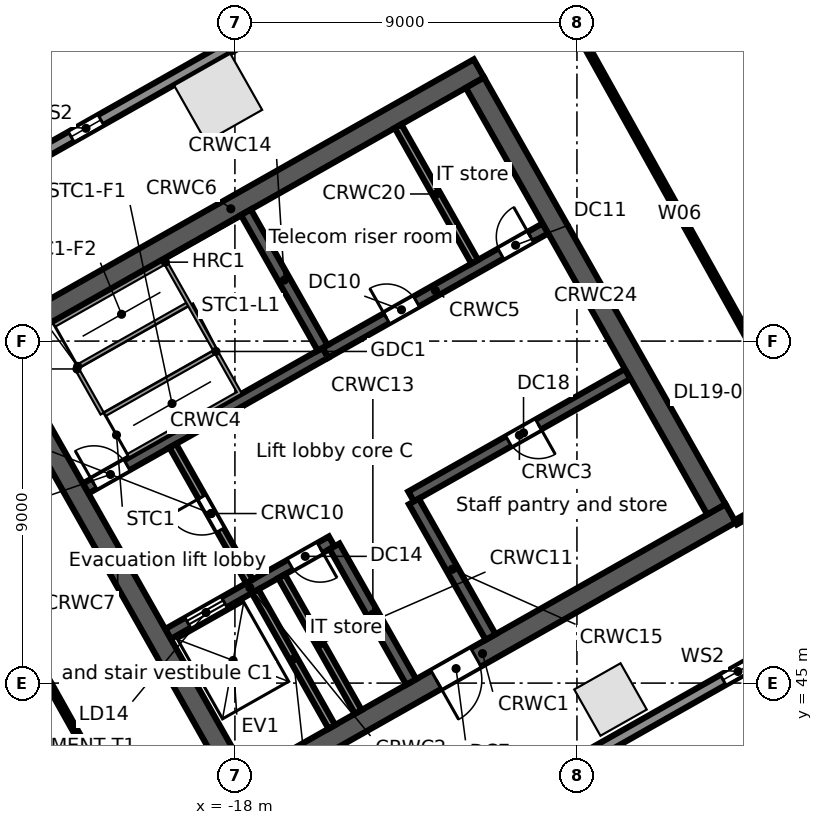
"""IFC4 building model, lengths in metres.
Left out: names, types, materials, properties, quantities, classifications, styles, units other than length and angle.
Written with IfcOpenShell. Run it as: python <this file> out.ifc"""

import sys

from ifc_helpers import new_model, si_unit, direction, frame, frame_2d, origin, origin_2d, place, context, subcontext, project, spatial, rectangle, extrude, element, fill, save


model = new_model("IFC4")
c1 = context("Model", 3, precision=1e-05, world=origin(), true_north=direction((0.0, 1.0)))
c2 = subcontext(c1, "Body", "Model", "MODEL_VIEW")
j1 = project(units=[si_unit("LENGTHUNIT", "METRE"), si_unit("PLANEANGLEUNIT", "RADIAN")], contexts=[c1])
p1 = place(None, origin())
s1 = spatial("IfcSite", under=j1, at=p1, CompositionType="ELEMENT")
p2 = place(p1, origin())
s2 = spatial("IfcBuilding", under=s1, at=p2, CompositionType="ELEMENT")
p3 = place(p2, frame((0.0, 0.0, 97.1)))
s3 = spatial("IfcBuildingStorey", under=s2, at=p3, CompositionType="ELEMENT", Elevation=97.1)
p4 = place(p3, frame((-18.441, 60.406, 0.0), z_axis=(0.0, 0.0, 1.0), x_axis=(-0.87035569594, -0.492423560103, 0.0)))
e1 = element("IfcColumn", 1, at=p4, inside=s3, PredefinedType="COLUMN", context=c2, shape_type="SweptSolid", body=[
    extrude(rectangle(XDim=1.7, YDim=1.7, at=origin_2d()), origin(), (0.0, 0.0, 1.0), 4.4),
])
p5 = place(p3, frame((-8.117, 44.568, 0.0), z_axis=(0.0, 0.0, 1.0), x_axis=(0.87035569594, 0.492423560103, 0.0)))
e2 = element("IfcColumn", 2, at=p5, inside=s3, PredefinedType="COLUMN", context=c2, shape_type="SweptSolid", body=[
    extrude(rectangle(XDim=1.4, YDim=1.4, at=origin_2d()), origin(), (0.0, 0.0, 1.0), 4.4),
])
p6 = place(p3, frame((-58.745, 38.764, 0.0), z_axis=(0.0, 0.0, 1.0), x_axis=(0.870355811726, 0.492423355453, 0.0)))
e3 = element("IfcWall", 3, at=p6, inside=s3, PredefinedType="STANDARD", context=c2, shape_type="SweptSolid", body=[
    extrude(rectangle(XDim=64.025, YDim=0.3, at=frame_2d((32.013, 0.0))), origin(), (0.0, 0.0, 1.0), 4.08),
])
p7 = place(p6, frame((60.122, 0.0, 0.6)))
e4 = element("IfcOpeningElement", 4, at=p7, cuts=e3, PredefinedType="OPENING", context=c2, shape_type="SweptSolid", body=[
    extrude(rectangle(XDim=0.9, YDim=2.8, at=frame_2d((0.45, 1.4))), frame((0.0, 0.16, 0.0), z_axis=(0.0, -1.0, 0.0), x_axis=(1.0, 0.0, 0.0)), (0.0, 0.0, 1.0), 0.32),
])
p8 = place(p6, frame((50.992, 0.0, 0.6)))
e5 = element("IfcOpeningElement", 5, at=p8, cuts=e3, PredefinedType="OPENING", context=c2, shape_type="SweptSolid", body=[
    extrude(rectangle(XDim=0.9, YDim=2.8, at=frame_2d((0.45, 1.4))), frame((0.0, 0.16, 0.0), z_axis=(0.0, -1.0, 0.0), x_axis=(1.0, 0.0, 0.0)), (0.0, 0.0, 1.0), 0.32),
])
p9 = place(p6, frame((41.862, 0.0, 0.6)))
e6 = element("IfcOpeningElement", 6, at=p9, cuts=e3, PredefinedType="OPENING", context=c2, shape_type="SweptSolid", body=[
    extrude(rectangle(XDim=0.9, YDim=2.8, at=frame_2d((0.45, 1.4))), frame((0.0, 0.16, 0.0), z_axis=(0.0, -1.0, 0.0), x_axis=(1.0, 0.0, 0.0)), (0.0, 0.0, 1.0), 0.32),
])
p10 = place(p6, frame((32.732, 0.0, 0.6)))
e7 = element("IfcOpeningElement", 7, at=p10, cuts=e3, PredefinedType="OPENING", context=c2, shape_type="SweptSolid", body=[
    extrude(rectangle(XDim=0.9, YDim=2.8, at=frame_2d((0.45, 1.4))), frame((0.0, 0.16, 0.0), z_axis=(0.0, -1.0, 0.0), x_axis=(1.0, 0.0, 0.0)), (0.0, 0.0, 1.0), 0.32),
])
p11 = place(p6, frame((23.602, 0.0, 0.6)))
e8 = element("IfcOpeningElement", 8, at=p11, cuts=e3, PredefinedType="OPENING", context=c2, shape_type="SweptSolid", body=[
    extrude(rectangle(XDim=0.9, YDim=2.8, at=frame_2d((0.45, 1.4))), frame((0.0, 0.16, 0.0), z_axis=(0.0, -1.0, 0.0), x_axis=(1.0, 0.0, 0.0)), (0.0, 0.0, 1.0), 0.32),
])
p12 = place(p6, frame((14.472, 0.0, 0.6)))
e9 = element("IfcOpeningElement", 9, at=p12, cuts=e3, PredefinedType="OPENING", context=c2, shape_type="SweptSolid", body=[
    extrude(rectangle(XDim=0.9, YDim=2.8, at=frame_2d((0.45, 1.4))), frame((0.0, 0.16, 0.0), z_axis=(0.0, -1.0, 0.0), x_axis=(1.0, 0.0, 0.0)), (0.0, 0.0, 1.0), 0.32),
])
p13 = place(p6, frame((5.342, 0.0, 0.6)))
e10 = element("IfcOpeningElement", 10, at=p13, cuts=e3, PredefinedType="OPENING", context=c2, shape_type="SweptSolid", body=[
    extrude(rectangle(XDim=0.9, YDim=2.8, at=frame_2d((0.45, 1.4))), frame((0.0, 0.16, 0.0), z_axis=(0.0, -1.0, 0.0), x_axis=(1.0, 0.0, 0.0)), (0.0, 0.0, 1.0), 0.32),
])
p14 = place(p3, frame((-0.055, 47.969, 0.0), z_axis=(0.0, 0.0, 1.0), x_axis=(-0.870355730478, -0.492423499058, 0.0)))
e11 = element("IfcWall", 11, at=p14, inside=s3, PredefinedType="STANDARD", context=c2, shape_type="SweptSolid", body=[
    extrude(rectangle(XDim=43.75, YDim=0.3, at=frame_2d((21.875, 0.0))), origin(), (0.0, 0.0, 1.0), 4.08),
])
p15 = place(p14, frame((39.977, 0.0, 0.6)))
e12 = element("IfcOpeningElement", 12, at=p15, cuts=e11, PredefinedType="OPENING", context=c2, shape_type="SweptSolid", body=[
    extrude(rectangle(XDim=0.9, YDim=2.8, at=frame_2d((0.45, 1.4))), frame((0.0, 0.16, 0.0), z_axis=(0.0, -1.0, 0.0), x_axis=(1.0, 0.0, 0.0)), (0.0, 0.0, 1.0), 0.32),
])
p16 = place(p14, frame((31.222, 0.0, 0.6)))
e13 = element("IfcOpeningElement", 13, at=p16, cuts=e11, PredefinedType="OPENING", context=c2, shape_type="SweptSolid", body=[
    extrude(rectangle(XDim=0.9, YDim=2.8, at=frame_2d((0.45, 1.4))), frame((0.0, 0.16, 0.0), z_axis=(0.0, -1.0, 0.0), x_axis=(1.0, 0.0, 0.0)), (0.0, 0.0, 1.0), 0.32),
])
p17 = place(p14, frame((22.468, 0.0, 0.6)))
e14 = element("IfcOpeningElement", 14, at=p17, cuts=e11, PredefinedType="OPENING", context=c2, shape_type="SweptSolid", body=[
    extrude(rectangle(XDim=0.9, YDim=2.8, at=frame_2d((0.45, 1.4))), frame((0.0, 0.16, 0.0), z_axis=(0.0, -1.0, 0.0), x_axis=(1.0, 0.0, 0.0)), (0.0, 0.0, 1.0), 0.32),
])
p18 = place(p14, frame((13.713, 0.0, 0.6)))
e15 = element("IfcOpeningElement", 15, at=p18, cuts=e11, PredefinedType="OPENING", context=c2, shape_type="SweptSolid", body=[
    extrude(rectangle(XDim=0.9, YDim=2.8, at=frame_2d((0.45, 1.4))), frame((0.0, 0.16, 0.0), z_axis=(0.0, -1.0, 0.0), x_axis=(1.0, 0.0, 0.0)), (0.0, 0.0, 1.0), 0.32),
])
p19 = place(p14, frame((4.959, 0.0, 0.6)))
e16 = element("IfcOpeningElement", 16, at=p19, cuts=e11, PredefinedType="OPENING", context=c2, shape_type="SweptSolid", body=[
    extrude(rectangle(XDim=0.9, YDim=2.8, at=frame_2d((0.45, 1.4))), frame((0.0, 0.16, 0.0), z_axis=(0.0, -1.0, 0.0), x_axis=(1.0, 0.0, 0.0)), (0.0, 0.0, 1.0), 0.32),
])
p20 = place(p3, frame((-18.012, 42.083, 0.0), z_axis=(0.0, 0.0, 1.0), x_axis=(0.870360574057, 0.492414937962, 0.0)))
e17 = element("IfcWall", 17, at=p20, inside=s3, PredefinedType="SOLIDWALL", context=c2, shape_type="SweptSolid", body=[
    extrude(rectangle(XDim=15.0, YDim=0.55, at=frame_2d((7.5, 0.0))), origin(), (0.0, 0.0, 1.0), 4.08),
])
p21 = place(p20, frame((6.1, 0.0, 0.0)))
e18 = element("IfcOpeningElement", 18, at=p21, cuts=e17, PredefinedType="OPENING", context=c2, shape_type="SweptSolid", body=[
    extrude(rectangle(XDim=1.2, YDim=2.1, at=frame_2d((0.6, 1.05))), frame((0.0, 0.285, 0.0), z_axis=(0.0, -1.0, 0.0), x_axis=(1.0, 0.0, 0.0)), (0.0, 0.0, 1.0), 0.57),
])
p22 = place(p3, frame((-19.762, 46.292, 0.0), z_axis=(0.0, 0.0, 1.0), x_axis=(0.870359758983, 0.49241637863, 0.0)))
e19 = element("IfcWall", 19, at=p22, inside=s3, PredefinedType="SOLIDWALL", context=c2, shape_type="SweptSolid", body=[
    extrude(rectangle(XDim=4.95, YDim=0.3, at=frame_2d((2.475, 0.0))), origin(), (0.0, 0.0, 1.0), 4.08),
])
p23 = place(p22, frame((0.6, 0.0, 0.0)))
e20 = element("IfcOpeningElement", 20, at=p23, cuts=e19, PredefinedType="OPENING", context=c2, shape_type="SweptSolid", body=[
    extrude(rectangle(XDim=1.1, YDim=2.1, at=frame_2d((0.55, 1.05))), frame((0.0, 0.16, 0.0), z_axis=(0.0, -1.0, 0.0), x_axis=(1.0, 0.0, 0.0)), (0.0, 0.0, 1.0), 0.32),
])
p24 = place(p22, frame((3.7, 0.0, 0.0)))
e21 = element("IfcOpeningElement", 21, at=p24, cuts=e19, PredefinedType="OPENING", context=c2, shape_type="SweptSolid", body=[
    extrude(rectangle(XDim=0.9, YDim=2.1, at=frame_2d((0.45, 1.05))), frame((0.0, 0.16, 0.0), z_axis=(0.0, -1.0, 0.0), x_axis=(1.0, 0.0, 0.0)), (0.0, 0.0, 1.0), 0.32),
])
p25 = place(p3, frame((-13.365, 49.911, 0.0), z_axis=(0.0, 0.0, 1.0), x_axis=(0.870336435567, 0.492457601144, 0.0)))
e22 = element("IfcWall", 22, at=p25, inside=s3, PredefinedType="SOLIDWALL", context=c2, shape_type="SweptSolid", body=[
    extrude(rectangle(XDim=6.55, YDim=0.3, at=frame_2d((3.275, 0.0))), origin(), (0.0, 0.0, 1.0), 4.08),
])
p26 = place(p25, frame((2.95, 0.0, 0.0)))
e23 = element("IfcOpeningElement", 23, at=p26, cuts=e22, PredefinedType="OPENING", context=c2, shape_type="SweptSolid", body=[
    extrude(rectangle(XDim=0.9, YDim=2.1, at=frame_2d((0.45, 1.05))), frame((0.0, 0.16, 0.0), z_axis=(0.0, -1.0, 0.0), x_axis=(1.0, 0.0, 0.0)), (0.0, 0.0, 1.0), 0.32),
])
p27 = place(p3, frame((-21.928, 50.121, 0.0), z_axis=(0.0, 0.0, 1.0), x_axis=(0.870340732628, 0.49245000673, 0.0)))
e24 = element("IfcWall", 24, at=p27, inside=s3, PredefinedType="SOLIDWALL", context=c2, shape_type="SweptSolid", body=[
    extrude(rectangle(XDim=7.25, YDim=0.3, at=frame_2d((3.625, 0.0))), origin(), (0.0, 0.0, 1.0), 4.08),
])
p28 = place(p27, frame((0.25, 0.0, 0.0)))
e25 = element("IfcOpeningElement", 25, at=p28, cuts=e24, PredefinedType="OPENING", context=c2, shape_type="SweptSolid", body=[
    extrude(rectangle(XDim=1.0, YDim=2.1, at=frame_2d((0.5, 1.05))), frame((0.0, 0.16, 0.0), z_axis=(0.0, -1.0, 0.0), x_axis=(1.0, 0.0, 0.0)), (0.0, 0.0, 1.0), 0.32),
])
p29 = place(p3, frame((-15.618, 53.691, 0.0), z_axis=(0.0, 0.0, 1.0), x_axis=(0.870367894134, 0.492401999246, 0.0)))
e26 = element("IfcWall", 26, at=p29, inside=s3, PredefinedType="SOLIDWALL", context=c2, shape_type="SweptSolid", body=[
    extrude(rectangle(XDim=6.65, YDim=0.3, at=frame_2d((3.325, 0.0))), origin(), (0.0, 0.0, 1.0), 4.08),
])
p30 = place(p29, frame((1.85, 0.0, 0.0)))
e27 = element("IfcOpeningElement", 27, at=p30, cuts=e26, PredefinedType="OPENING", context=c2, shape_type="SweptSolid", body=[
    extrude(rectangle(XDim=0.9, YDim=2.1, at=frame_2d((0.45, 1.05))), frame((0.0, 0.16, 0.0), z_axis=(0.0, -1.0, 0.0), x_axis=(1.0, 0.0, 0.0)), (0.0, 0.0, 1.0), 0.32),
])
p31 = place(p29, frame((5.3, 0.0, 0.0)))
e28 = element("IfcOpeningElement", 28, at=p31, cuts=e26, PredefinedType="OPENING", context=c2, shape_type="SweptSolid", body=[
    extrude(rectangle(XDim=0.9, YDim=2.1, at=frame_2d((0.45, 1.05))), frame((0.0, 0.16, 0.0), z_axis=(0.0, -1.0, 0.0), x_axis=(1.0, 0.0, 0.0)), (0.0, 0.0, 1.0), 0.32),
])
p32 = place(p3, frame((-24.635, 53.789, 0.0), z_axis=(0.0, 0.0, 1.0), x_axis=(0.870360574057, 0.492414937962, 0.0)))
e29 = element("IfcWall", 29, at=p32, inside=s3, PredefinedType="SOLIDWALL", context=c2, shape_type="SweptSolid", body=[
    extrude(rectangle(XDim=15.0, YDim=0.55, at=frame_2d((7.5, 0.0))), origin(), (0.0, 0.0, 1.0), 4.08),
])
p33 = place(p3, frame((-24.26, 53.685, 0.0), z_axis=(0.0, 0.0, 1.0), x_axis=(0.492427022044, -0.870353737259, 0.0)))
e30 = element("IfcWall", 30, at=p33, inside=s3, PredefinedType="SOLIDWALL", context=c2, shape_type="SweptSolid", body=[
    extrude(rectangle(XDim=12.9, YDim=0.55, at=frame_2d((6.45, 0.0))), origin(), (0.0, 0.0, 1.0), 4.08),
])
p34 = place(p3, frame((-17.469, 47.417, 0.0), z_axis=(0.0, 0.0, 1.0), x_axis=(0.492453559952, -0.87033872216, 0.0)))
e31 = element("IfcWall", 31, at=p34, inside=s3, PredefinedType="SOLIDWALL", context=c2, shape_type="SweptSolid", body=[
    extrude(rectangle(XDim=4.1, YDim=0.2, at=frame_2d((2.05, 0.0))), origin(), (0.0, 0.0, 1.0), 4.08),
])
p35 = place(p3, frame((-19.635, 51.246, 0.0), z_axis=(0.0, 0.0, 1.0), x_axis=(0.492408451753, -0.87036424366, 0.0)))
e32 = element("IfcWall", 32, at=p35, inside=s3, PredefinedType="PARTITIONING", context=c2, shape_type="SweptSolid", body=[
    extrude(rectangle(XDim=4.1, YDim=0.2, at=frame_2d((2.05, 0.0))), origin(), (0.0, 0.0, 1.0), 4.08),
])
p36 = place(p35, frame((1.55, 0.0, 0.0)))
e33 = element("IfcOpeningElement", 33, at=p36, cuts=e32, PredefinedType="OPENING", context=c2, shape_type="SweptSolid", body=[
    extrude(rectangle(XDim=1.0, YDim=2.1, at=frame_2d((0.5, 1.05))), frame((0.0, 0.11, 0.0), z_axis=(0.0, -1.0, 0.0), x_axis=(1.0, 0.0, 0.0)), (0.0, 0.0, 1.0), 0.22),
])
p37 = place(p3, frame((-16.772, 47.811, 0.0), z_axis=(0.0, 0.0, 1.0), x_axis=(0.492428039142, -0.870353161807, 0.0)))
e34 = element("IfcWall", 34, at=p37, inside=s3, PredefinedType="SOLIDWALL", context=c2, shape_type="SweptSolid", body=[
    extrude(rectangle(XDim=4.1, YDim=0.2, at=frame_2d((2.05, 0.0))), origin(), (0.0, 0.0, 1.0), 4.08),
])
for number, where, z_axis, x_axis in (
    (35, (-15.379, 48.599, 0.0), (0.0, 0.0, 1.0), (0.492, -0.87, 0.0)),
    (36, (-17.711, 57.39, 0.0), (0.0, 0.0, 1.0), (0.492, -0.87, 0.0)),
):
    element("IfcWall", number, at=place(p3, frame(where, z_axis=z_axis, x_axis=x_axis)), inside=s3, PredefinedType="SOLIDWALL", context=c2, shape_type="SweptSolid", body=[
        extrude(rectangle(XDim=4.1, YDim=0.3, at=frame_2d((2.05, 0.0))), origin(), (0.0, 0.0, 1.0), 4.08),
    ])
p38 = place(p3, frame((-13.291, 49.781, 0.0), z_axis=(0.0, 0.0, 1.0), x_axis=(0.492382931784, -0.870378681085, 0.0)))
e37 = element("IfcWall", 37, at=p38, inside=s3, PredefinedType="SOLIDWALL", context=c2, shape_type="SweptSolid", body=[
    extrude(rectangle(XDim=4.1, YDim=0.3, at=frame_2d((2.05, 0.0))), origin(), (0.0, 0.0, 1.0), 4.08),
])
p39 = place(p3, frame((-13.708, 59.656, 0.0), z_axis=(0.0, 0.0, 1.0), x_axis=(0.492428039142, -0.870353161807, 0.0)))
e38 = element("IfcWall", 38, at=p39, inside=s3, PredefinedType="PARTITIONING", context=c2, shape_type="SweptSolid", body=[
    extrude(rectangle(XDim=4.1, YDim=0.2, at=frame_2d((2.05, 0.0))), origin(), (0.0, 0.0, 1.0), 4.08),
])
p40 = place(p3, frame((-11.684, 60.8, 0.0), z_axis=(0.0, 0.0, 1.0), x_axis=(0.492427022044, -0.870353737259, 0.0)))
e39 = element("IfcWall", 39, at=p40, inside=s3, PredefinedType="SOLIDWALL", context=c2, shape_type="SweptSolid", body=[
    extrude(rectangle(XDim=12.9, YDim=0.55, at=frame_2d((6.45, 0.0))), origin(), (0.0, 0.0, 1.0), 4.08),
])
p41 = place(p3, frame((-28.799, 55.534, 0.0), z_axis=(0.0, 0.0, 1.0), x_axis=(0.488587464104, -0.872514922463, 0.0)))
e40 = element("IfcWall", 40, at=p41, inside=s3, PredefinedType="PARTITIONING", context=c2, shape_type="SweptSolid", body=[
    extrude(rectangle(XDim=17.295, YDim=0.125, at=frame_2d((8.647, 0.0))), origin(), (0.0, 0.0, 1.0), 3.148),
])
p42 = place(p3, frame((-10.088, 64.155, 0.0), z_axis=(0.0, 0.0, 1.0), x_axis=(0.486446127767, -0.873710572661, 0.0)))
e41 = element("IfcWall", 41, at=p42, inside=s3, PredefinedType="PARTITIONING", context=c2, shape_type="SweptSolid", body=[
    extrude(rectangle(XDim=15.584, YDim=0.125, at=frame_2d((7.792, 0.0))), origin(), (0.0, 0.0, 1.0), 3.16),
])
p43 = place(p3, frame((-4.821, 49.23, 0.0), z_axis=(0.0, 0.0, 1.0), x_axis=(0.870371217631, 0.492396124598, 0.0)))
e42 = element("IfcWall", 42, at=p43, inside=s3, PredefinedType="PARTITIONING", context=c2, shape_type="SweptSolid", body=[
    extrude(rectangle(XDim=2.659, YDim=0.125, at=frame_2d((1.329, 0.0))), origin(), (0.0, 0.0, 1.0), 4.08),
])
p44 = place(p9, origin())
e43 = element("IfcWindow", 43, at=p44, inside=s3, PartitioningType="SINGLE_PANEL", PredefinedType="WINDOW", context=c2, shape_type="SweptSolid", body=[
    extrude(rectangle(XDim=0.9, YDim=2.8, at=frame_2d((0.45, 1.4))), frame((0.0, 0.03, 0.0), z_axis=(0.0, -1.0, 0.0), x_axis=(1.0, 0.0, 0.0)), (0.0, 0.0, 1.0), 0.06),
])
fill(e6, e43)
p45 = place(p19, origin())
e44 = element("IfcWindow", 44, at=p45, inside=s3, PartitioningType="SINGLE_PANEL", PredefinedType="WINDOW", context=c2, shape_type="SweptSolid", body=[
    extrude(rectangle(XDim=0.9, YDim=2.8, at=frame_2d((0.45, 1.4))), frame((0.0, 0.03, 0.0), z_axis=(0.0, -1.0, 0.0), x_axis=(1.0, 0.0, 0.0)), (0.0, 0.0, 1.0), 0.06),
])
fill(e16, e44)
p46 = place(p23, origin())
e45 = element("IfcDoor", 45, at=p46, inside=s3, OperationType="DOUBLE_DOOR_SLIDING", PredefinedType="DOOR", context=c2, shape_type="SweptSolid", body=[
    extrude(rectangle(XDim=1.1, YDim=2.1, at=frame_2d((0.55, 1.05))), frame((0.0, 0.025, 0.0), z_axis=(0.0, -1.0, 0.0), x_axis=(1.0, 0.0, 0.0)), (0.0, 0.0, 1.0), 0.05),
])
fill(e20, e45)
p47 = place(p28, origin())
e46 = element("IfcDoor", 46, at=p47, inside=s3, OperationType="SINGLE_SWING_LEFT", PredefinedType="DOOR", context=c2, shape_type="SweptSolid", body=[
    extrude(rectangle(XDim=1.0, YDim=2.1, at=frame_2d((0.5, 1.05))), frame((0.0, 0.025, 0.0), z_axis=(0.0, -1.0, 0.0), x_axis=(1.0, 0.0, 0.0)), (0.0, 0.0, 1.0), 0.05),
])
fill(e25, e46)
p48 = place(p36, frame((1.0, 0.0, 0.0), z_axis=(0.0, 0.0, 1.0), x_axis=(-1.0, 0.0, 0.0)))
e47 = element("IfcDoor", 47, at=p48, inside=s3, OperationType="SINGLE_SWING_RIGHT", PredefinedType="DOOR", context=c2, shape_type="SweptSolid", body=[
    extrude(rectangle(XDim=1.0, YDim=2.1, at=frame_2d((0.5, 1.05))), frame((0.0, 0.025, 0.0), z_axis=(0.0, -1.0, 0.0), x_axis=(1.0, 0.0, 0.0)), (0.0, 0.0, 1.0), 0.05),
])
fill(e33, e47)
p49 = place(p21, frame((1.2, 0.0, 0.0), z_axis=(0.0, 0.0, 1.0), x_axis=(-1.0, 0.0, 0.0)))
e48 = element("IfcDoor", 48, at=p49, inside=s3, OperationType="SINGLE_SWING_RIGHT", PredefinedType="DOOR", context=c2, shape_type="SweptSolid", body=[
    extrude(rectangle(XDim=1.2, YDim=2.1, at=frame_2d((0.6, 1.05))), frame((0.0, 0.025, 0.0), z_axis=(0.0, -1.0, 0.0), x_axis=(1.0, 0.0, 0.0)), (0.0, 0.0, 1.0), 0.05),
])
fill(e18, e48)
p50 = place(p30, origin())
e49 = element("IfcDoor", 49, at=p50, inside=s3, OperationType="SINGLE_SWING_LEFT", PredefinedType="DOOR", context=c2, shape_type="SweptSolid", body=[
    extrude(rectangle(XDim=0.9, YDim=2.1, at=frame_2d((0.45, 1.05))), frame((0.0, 0.025, 0.0), z_axis=(0.0, -1.0, 0.0), x_axis=(1.0, 0.0, 0.0)), (0.0, 0.0, 1.0), 0.05),
])
fill(e27, e49)
p51 = place(p31, origin())
e50 = element("IfcDoor", 50, at=p51, inside=s3, OperationType="SINGLE_SWING_RIGHT", PredefinedType="DOOR", context=c2, shape_type="SweptSolid", body=[
    extrude(rectangle(XDim=0.9, YDim=2.1, at=frame_2d((0.45, 1.05))), frame((0.0, 0.025, 0.0), z_axis=(0.0, -1.0, 0.0), x_axis=(1.0, 0.0, 0.0)), (0.0, 0.0, 1.0), 0.05),
])
fill(e28, e50)
p52 = place(p24, frame((0.9, 0.0, 0.0), z_axis=(0.0, 0.0, 1.0), x_axis=(-1.0, 0.0, 0.0)))
e51 = element("IfcDoor", 51, at=p52, inside=s3, OperationType="SINGLE_SWING_LEFT", PredefinedType="DOOR", context=c2, shape_type="SweptSolid", body=[
    extrude(rectangle(XDim=0.9, YDim=2.1, at=frame_2d((0.45, 1.05))), frame((0.0, 0.025, 0.0), z_axis=(0.0, -1.0, 0.0), x_axis=(1.0, 0.0, 0.0)), (0.0, 0.0, 1.0), 0.05),
])
fill(e21, e51)
p53 = place(p26, frame((0.9, 0.0, 0.0), z_axis=(0.0, 0.0, 1.0), x_axis=(-1.0, 0.0, 0.0)))
e52 = element("IfcDoor", 52, at=p53, inside=s3, OperationType="SINGLE_SWING_LEFT", PredefinedType="DOOR", context=c2, shape_type="SweptSolid", body=[
    extrude(rectangle(XDim=0.9, YDim=2.1, at=frame_2d((0.45, 1.05))), frame((0.0, 0.025, 0.0), z_axis=(0.0, -1.0, 0.0), x_axis=(1.0, 0.0, 0.0)), (0.0, 0.0, 1.0), 0.05),
])
fill(e23, e52)
save(model, sys.argv[1])
